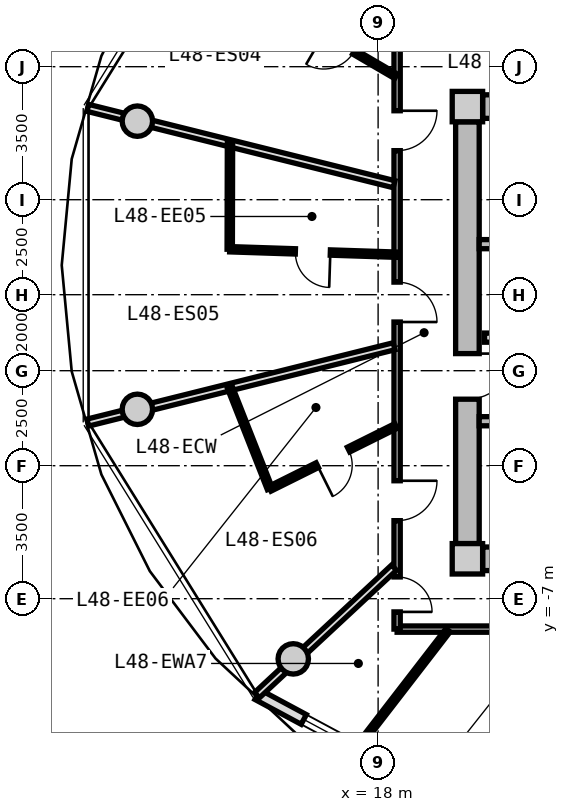
"""IFC4 building model, lengths in metres.
Left out: names, types, materials, properties, quantities, classifications, styles, units other than length and angle.
Written with IfcOpenShell. Run it as: python <this file> out.ifc"""

import sys

from ifc_helpers import new_model, si_unit, direction, frame, frame_2d, origin, origin_2d, place, context, subcontext, project, spatial, rectangle, circle, extrude, source, transform, mapped, element, fill, save


model = new_model("IFC4")
c1 = context("Model", 3, precision=1e-05, world=origin(), true_north=direction((0.0, 1.0)))
c2 = subcontext(c1, "Body", "Model", "MODEL_VIEW")
j1 = project(units=[si_unit("LENGTHUNIT", "METRE"), si_unit("PLANEANGLEUNIT", "RADIAN")], contexts=[c1])
p1 = place(None, origin())
s1 = spatial("IfcSite", under=j1, at=p1, CompositionType="ELEMENT")
p2 = place(p1, origin())
s2 = spatial("IfcBuilding", under=s1, at=p2, CompositionType="ELEMENT")
p3 = place(p2, frame((0.0, 0.0, 155.65)))
s3 = spatial("IfcBuildingStorey", under=s2, at=p3, CompositionType="ELEMENT", Elevation=155.65)
m1 = source(origin(), c2, "Body", "SweptSolid", [
    extrude(rectangle(XDim=0.8, YDim=0.8, at=origin_2d()), origin(), (0.0, 0.0, 1.0), 3.05),
])
for number, where, z_axis, x_axis in (
    (1, (20.35, -5.95, 0.0), (0.0, 0.0, 1.0), (1.0, 0.0, 0.0)),
    (2, (20.35, 5.95, 0.0), (0.0, 0.0, 1.0), (1.0, 0.0, 0.0)),
):
    element("IfcColumn", number, at=place(p3, frame(where, z_axis=z_axis, x_axis=x_axis)), inside=s3, PredefinedType="COLUMN", context=c2, shape_type="MappedRepresentation", body=[
        mapped(m1, transform((0.0, 0.0, 0.0), x_axis=(1.0, 0.0, 0.0), y_axis=(0.0, 1.0, 0.0), z_axis=(0.0, 0.0, 1.0), scale=1.0)),
    ])
m2 = source(origin(), c2, "Body", "SweptSolid", [
    extrude(rectangle(XDim=14.5, YDim=0.62, at=frame_2d((7.25, 0.0))), origin(), (0.0, 0.0, 1.0), 2.81),
])
for number, where, z_axis, x_axis in (
    (3, (20.75, 5.95, 0.0), (0.0, 0.0, 1.0), (1.0, 0.0, 0.0)),
    (4, (35.25, -5.95, 0.0), (0.0, 0.0, 1.0), (-1.0, 0.0, 0.0)),
):
    element("IfcWall", number, at=place(p3, frame(where, z_axis=z_axis, x_axis=x_axis)), inside=s3, PredefinedType="SHEAR", context=c2, shape_type="MappedRepresentation", body=[
        mapped(m2, transform((0.0, 0.0, 0.0), x_axis=(1.0, 0.0, 0.0), y_axis=(0.0, 1.0, 0.0), z_axis=(0.0, 0.0, 1.0), scale=1.0)),
    ])
m3 = source(origin(), c2, "Body", "SweptSolid", [
    extrude(rectangle(XDim=11.1, YDim=0.62, at=frame_2d((5.55, 0.0))), origin(), (0.0, 0.0, 1.0), 2.81),
])
p4 = place(p3, frame((20.35, -5.55, 0.0), z_axis=(0.0, 0.0, 1.0), x_axis=(0.0, 1.0, 0.0)))
e5 = element("IfcWall", 5, at=p4, inside=s3, PredefinedType="SHEAR", context=c2, shape_type="MappedRepresentation", body=[
    mapped(m3, transform((0.0, 0.0, 0.0), x_axis=(1.0, 0.0, 0.0), y_axis=(0.0, 1.0, 0.0), z_axis=(0.0, 0.0, 1.0), scale=1.0)),
])
p5 = place(p4, frame((3.8, 0.0, 0.0)))
e6 = element("IfcOpeningElement", 6, at=p5, cuts=e5, PredefinedType="OPENING", context=c2, shape_type="SweptSolid", body=[
    extrude(rectangle(XDim=1.2, YDim=2.15, at=frame_2d((0.6, 1.075))), frame((0.0, 0.32, 0.0), z_axis=(0.0, -1.0, 0.0), x_axis=(1.0, 0.0, 0.0)), (0.0, 0.0, 1.0), 0.64),
])
m4 = source(origin(), c2, "Body", "SweptSolid", [
    extrude(circle(Radius=0.4, at=origin_2d()), origin(), (0.0, 0.0, 1.0), 3.05),
])
for number, where, z_axis, x_axis in (
    (7, (11.665, 5.567, 0.0), (0.0, 0.0, 1.0), (1.0, 0.0, 0.0)),
    (8, (11.665, -2.016, 0.0), (0.0, 0.0, 1.0), (1.0, 0.0, 0.0)),
    (9, (15.767, -8.584, 0.0), (0.0, 0.0, 1.0), (1.0, 0.0, 0.0)),
):
    element("IfcColumn", number, at=place(p3, frame(where, z_axis=z_axis, x_axis=x_axis)), inside=s3, PredefinedType="COLUMN", context=c2, shape_type="MappedRepresentation", body=[
        mapped(m4, transform((0.0, 0.0, 0.0), x_axis=(1.0, 0.0, 0.0), y_axis=(0.0, 1.0, 0.0), z_axis=(0.0, 0.0, 1.0), scale=1.0)),
    ])
m5 = source(origin(), c2, "Body", "SweptSolid", [
    extrude(rectangle(XDim=8.742, YDim=0.29, at=frame_2d((4.371, 0.0))), origin(), (0.0, 0.0, 1.0), 2.81),
])
p6 = place(p3, frame((22.529, -13.66, 0.0), z_axis=(0.0, 0.0, 1.0), x_axis=(-0.880998740657, 0.473118609823, 0.0)))
e10 = element("IfcWall", 10, at=p6, inside=s3, PredefinedType="SOLIDWALL", context=c2, shape_type="MappedRepresentation", body=[
    mapped(m5, transform((0.0, 0.0, 0.0), x_axis=(1.0, 0.0, 0.0), y_axis=(0.0, 1.0, 0.0), z_axis=(0.0, 0.0, 1.0), scale=1.0)),
])
p7 = place(p6, frame((0.9, 0.0, 0.0)))
e11 = element("IfcOpeningElement", 11, at=p7, cuts=e10, PredefinedType="OPENING", context=c2, shape_type="SweptSolid", body=[
    extrude(rectangle(XDim=1.15, YDim=2.25, at=frame_2d((0.575, 1.125))), frame((0.0, 0.155, 0.0), z_axis=(0.0, -1.0, 0.0), x_axis=(1.0, 0.0, 0.0)), (0.0, 0.0, 1.0), 0.31),
])
p8 = place(p6, frame((6.161, 0.0, 0.85)))
e12 = element("IfcOpeningElement", 12, at=p8, cuts=e10, PredefinedType="OPENING", context=c2, shape_type="SweptSolid", body=[
    extrude(rectangle(XDim=1.2, YDim=1.5, at=frame_2d((0.6, 0.75))), frame((0.0, 0.155, 0.0), z_axis=(0.0, -1.0, 0.0), x_axis=(1.0, 0.0, 0.0)), (0.0, 0.0, 1.0), 0.31),
])
m6 = source(origin(), c2, "Body", "SweptSolid", [
    extrude(rectangle(XDim=7.88, YDim=0.24, at=frame_2d((3.94, 0.0))), origin(), (0.0, 0.0, 1.0), 2.81),
])
p9 = place(p3, frame((20.66, 2.33, 0.0), z_axis=(0.0, 0.0, 1.0), x_axis=(1.0, 0.0, 0.0)))
e13 = element("IfcWall", 13, at=p9, inside=s3, PredefinedType="PARTITIONING", context=c2, shape_type="MappedRepresentation", body=[
    mapped(m6, transform((0.0, 0.0, 0.0), x_axis=(1.0, 0.0, 0.0), y_axis=(0.0, 1.0, 0.0), z_axis=(0.0, 0.0, 1.0), scale=1.0)),
])
p10 = place(p3, frame((20.66, -2.33, 0.0), z_axis=(0.0, 0.0, 1.0), x_axis=(1.0, 0.0, 0.0)))
e14 = element("IfcWall", 14, at=p10, inside=s3, PredefinedType="PARTITIONING", context=c2, shape_type="MappedRepresentation", body=[
    mapped(m6, transform((0.0, 0.0, 0.0), x_axis=(1.0, 0.0, 0.0), y_axis=(0.0, 1.0, 0.0), z_axis=(0.0, 0.0, 1.0), scale=1.0)),
])
p11 = place(p10, frame((1.0, 0.0, 0.0)))
e15 = element("IfcOpeningElement", 15, at=p11, cuts=e14, PredefinedType="OPENING", context=c2, shape_type="SweptSolid", body=[
    extrude(rectangle(XDim=1.1, YDim=2.15, at=frame_2d((0.55, 1.075))), frame((0.0, 0.13, 0.0), z_axis=(0.0, -1.0, 0.0), x_axis=(1.0, 0.0, 0.0)), (0.0, 0.0, 1.0), 0.26),
])
m7 = source(origin(), c2, "Body", "SweptSolid", [
    extrude(rectangle(XDim=7.62, YDim=0.24, at=frame_2d((3.81, 0.0))), origin(), (0.0, 0.0, 1.0), 2.795),
])
p12 = place(p3, frame((20.8, -0.13, 0.0), z_axis=(0.0, 0.0, 1.0), x_axis=(1.0, 0.0, 0.0)))
e16 = element("IfcWall", 16, at=p12, inside=s3, PredefinedType="PARTITIONING", context=c2, shape_type="MappedRepresentation", body=[
    mapped(m7, transform((0.0, 0.0, 0.0), x_axis=(1.0, 0.0, 0.0), y_axis=(0.0, 1.0, 0.0), z_axis=(0.0, 0.0, 1.0), scale=1.0)),
])
p13 = place(p12, frame((6.22, 0.0, 0.0)))
e17 = element("IfcOpeningElement", 17, at=p13, cuts=e16, PredefinedType="OPENING", context=c2, shape_type="SweptSolid", body=[
    extrude(rectangle(XDim=1.0, YDim=2.1, at=frame_2d((0.5, 1.05))), frame((0.0, 0.13, 0.0), z_axis=(0.0, -1.0, 0.0), x_axis=(1.0, 0.0, 0.0)), (0.0, 0.0, 1.0), 0.26),
])
p14 = place(p12, frame((2.4, 0.0, 0.0)))
e18 = element("IfcOpeningElement", 18, at=p14, cuts=e16, PredefinedType="OPENING", context=c2, shape_type="SweptSolid", body=[
    extrude(rectangle(XDim=1.0, YDim=2.1, at=frame_2d((0.5, 1.05))), frame((0.0, 0.13, 0.0), z_axis=(0.0, -1.0, 0.0), x_axis=(1.0, 0.0, 0.0)), (0.0, 0.0, 1.0), 0.26),
])
m8 = source(origin(), c2, "Body", "SweptSolid", [
    extrude(rectangle(XDim=8.6, YDim=0.165, at=frame_2d((4.3, 0.0))), origin(), (0.0, 0.0, 1.0), 2.795),
])
p15 = place(p3, frame((27.1, -7.8, 0.0), z_axis=(0.0, 0.0, 1.0), x_axis=(-1.0, 0.0, 0.0)))
e19 = element("IfcWall", 19, at=p15, inside=s3, PredefinedType="PARTITIONING", context=c2, shape_type="MappedRepresentation", body=[
    mapped(m8, transform((0.0, 0.0, 0.0), x_axis=(1.0, 0.0, 0.0), y_axis=(0.0, 1.0, 0.0), z_axis=(0.0, 0.0, 1.0), scale=1.0)),
])
p16 = place(p15, frame((4.625, 0.0, 0.0)))
e20 = element("IfcOpeningElement", 20, at=p16, cuts=e19, PredefinedType="OPENING", context=c2, shape_type="SweptSolid", body=[
    extrude(rectangle(XDim=0.92, YDim=2.1, at=frame_2d((0.46, 1.05))), frame((0.0, 0.093, 0.0), z_axis=(0.0, -1.0, 0.0), x_axis=(1.0, 0.0, 0.0)), (0.0, 0.0, 1.0), 0.185),
])
m9 = source(origin(), c2, "Body", "SweptSolid", [
    extrude(rectangle(XDim=15.6, YDim=0.165, at=frame_2d((7.8, 0.0))), origin(), (0.0, 0.0, 1.0), 2.795),
])
p17 = place(p3, frame((18.5, -7.8, 0.0), z_axis=(0.0, 0.0, 1.0), x_axis=(0.0, 1.0, 0.0)))
e21 = element("IfcWall", 21, at=p17, inside=s3, PredefinedType="PARTITIONING", context=c2, shape_type="MappedRepresentation", body=[
    mapped(m9, transform((0.0, 0.0, 0.0), x_axis=(1.0, 0.0, 0.0), y_axis=(0.0, 1.0, 0.0), z_axis=(0.0, 0.0, 1.0), scale=1.0)),
])
p18 = place(p17, frame((12.591, 0.0, 0.0)))
e22 = element("IfcOpeningElement", 22, at=p18, cuts=e21, PredefinedType="OPENING", context=c2, shape_type="SweptSolid", body=[
    extrude(rectangle(XDim=1.05, YDim=2.15, at=frame_2d((0.525, 1.075))), frame((0.0, 0.093, 0.0), z_axis=(0.0, -1.0, 0.0), x_axis=(1.0, 0.0, 0.0)), (0.0, 0.0, 1.0), 0.185),
])
p19 = place(p17, frame((8.081, 0.0, 0.0)))
e23 = element("IfcOpeningElement", 23, at=p19, cuts=e21, PredefinedType="OPENING", context=c2, shape_type="SweptSolid", body=[
    extrude(rectangle(XDim=1.05, YDim=2.15, at=frame_2d((0.525, 1.075))), frame((0.0, 0.093, 0.0), z_axis=(0.0, -1.0, 0.0), x_axis=(1.0, 0.0, 0.0)), (0.0, 0.0, 1.0), 0.185),
])
p20 = place(p17, frame((2.854, 0.0, 0.0)))
e24 = element("IfcOpeningElement", 24, at=p20, cuts=e21, PredefinedType="OPENING", context=c2, shape_type="SweptSolid", body=[
    extrude(rectangle(XDim=1.05, YDim=2.15, at=frame_2d((0.525, 1.075))), frame((0.0, 0.093, 0.0), z_axis=(0.0, -1.0, 0.0), x_axis=(1.0, 0.0, 0.0)), (0.0, 0.0, 1.0), 0.185),
])
p21 = place(p17, frame((0.452, 0.0, 0.0)))
e25 = element("IfcOpeningElement", 25, at=p21, cuts=e21, PredefinedType="OPENING", context=c2, shape_type="SweptSolid", body=[
    extrude(rectangle(XDim=0.92, YDim=2.1, at=frame_2d((0.46, 1.05))), frame((0.0, 0.093, 0.0), z_axis=(0.0, -1.0, 0.0), x_axis=(1.0, 0.0, 0.0)), (0.0, 0.0, 1.0), 0.185),
])
m10 = source(origin(), c2, "Body", "SweptSolid", [
    extrude(rectangle(XDim=8.305, YDim=0.19, at=frame_2d((4.153, 0.0))), origin(), (0.0, 0.0, 1.0), 2.345),
])
p22 = place(p3, frame((18.42, 3.908, 0.0), z_axis=(0.0, 0.0, 1.0), x_axis=(-0.970309994378, 0.241864662175, 0.0)))
e26 = element("IfcWall", 26, at=p22, inside=s3, PredefinedType="PARTITIONING", context=c2, shape_type="MappedRepresentation", body=[
    mapped(m10, transform((0.0, 0.0, 0.0), x_axis=(1.0, 0.0, 0.0), y_axis=(0.0, 1.0, 0.0), z_axis=(0.0, 0.0, 1.0), scale=1.0)),
])
m11 = source(origin(), c2, "Body", "SweptSolid", [
    extrude(rectangle(XDim=3.481, YDim=0.14, at=frame_2d((1.74, 0.0))), origin(), (0.0, 0.0, 1.0), 2.795),
])
p23 = place(p3, frame((18.47, 6.748, 0.0), z_axis=(0.0, 0.0, 1.0), x_axis=(-0.863310428788, 0.504673264148, 0.0)))
e27 = element("IfcWall", 27, at=p23, inside=s3, PredefinedType="PARTITIONING", context=c2, shape_type="MappedRepresentation", body=[
    mapped(m11, transform((0.0, 0.0, 0.0), x_axis=(1.0, 0.0, 0.0), y_axis=(0.0, 1.0, 0.0), z_axis=(0.0, 0.0, 1.0), scale=1.0)),
])
p24 = place(p23, frame((1.28, 0.0, 0.0)))
e28 = element("IfcOpeningElement", 28, at=p24, cuts=e27, PredefinedType="OPENING", context=c2, shape_type="SweptSolid", body=[
    extrude(rectangle(XDim=0.92, YDim=2.1, at=frame_2d((0.46, 1.05))), frame((0.0, 0.08, 0.0), z_axis=(0.0, -1.0, 0.0), x_axis=(1.0, 0.0, 0.0)), (0.0, 0.0, 1.0), 0.16),
])
p25 = place(p3, frame((18.42, -0.357, 0.0), z_axis=(0.0, 0.0, 1.0), x_axis=(-0.970309994378, -0.241864662175, 0.0)))
e29 = element("IfcWall", 29, at=p25, inside=s3, PredefinedType="PARTITIONING", context=c2, shape_type="MappedRepresentation", body=[
    mapped(m10, transform((0.0, 0.0, 0.0), x_axis=(1.0, 0.0, 0.0), y_axis=(0.0, 1.0, 0.0), z_axis=(0.0, 0.0, 1.0), scale=1.0)),
])
m12 = source(origin(), c2, "Body", "SweptSolid", [
    extrude(rectangle(XDim=4.377, YDim=0.14, at=frame_2d((2.188, 0.0))), origin(), (0.0, 0.0, 1.0), 2.795),
])
p26 = place(p3, frame((18.47, 2.053, 0.0), z_axis=(0.0, 0.0, 1.0), x_axis=(-0.99946745582, 0.032631346225, 0.0)))
e30 = element("IfcWall", 30, at=p26, inside=s3, PredefinedType="PARTITIONING", context=c2, shape_type="MappedRepresentation", body=[
    mapped(m12, transform((0.0, 0.0, 0.0), x_axis=(1.0, 0.0, 0.0), y_axis=(0.0, 1.0, 0.0), z_axis=(0.0, 0.0, 1.0), scale=1.0)),
])
p27 = place(p26, frame((1.729, 0.0, 0.0)))
e31 = element("IfcOpeningElement", 31, at=p27, cuts=e30, PredefinedType="OPENING", context=c2, shape_type="SweptSolid", body=[
    extrude(rectangle(XDim=0.92, YDim=2.1, at=frame_2d((0.46, 1.05))), frame((0.0, 0.08, 0.0), z_axis=(0.0, -1.0, 0.0), x_axis=(1.0, 0.0, 0.0)), (0.0, 0.0, 1.0), 0.16),
])
m13 = source(origin(), c2, "Body", "SweptSolid", [
    extrude(rectangle(XDim=2.806, YDim=0.14, at=frame_2d((1.403, 0.0))), origin(), (0.0, 0.0, 1.0), 2.795),
])
p28 = place(p3, frame((14.095, 2.196, 0.0), z_axis=(0.0, 0.0, 1.0), x_axis=(0.002435834444, 0.999997033351, 0.0)))
e32 = element("IfcWall", 32, at=p28, inside=s3, PredefinedType="PARTITIONING", context=c2, shape_type="MappedRepresentation", body=[
    mapped(m13, transform((0.0, 0.0, 0.0), x_axis=(1.0, 0.0, 0.0), y_axis=(0.0, 1.0, 0.0), z_axis=(0.0, 0.0, 1.0), scale=1.0)),
])
m14 = source(origin(), c2, "Body", "SweptSolid", [
    extrude(rectangle(XDim=4.927, YDim=0.19, at=frame_2d((2.463, 0.0))), origin(), (0.0, 0.0, 1.0), 2.345),
])
p29 = place(p3, frame((18.42, -6.183, 0.0), z_axis=(0.0, 0.0, 1.0), x_axis=(-0.732191335987, -0.681098999783, 0.0)))
e33 = element("IfcWall", 33, at=p29, inside=s3, PredefinedType="PARTITIONING", context=c2, shape_type="MappedRepresentation", body=[
    mapped(m14, transform((0.0, 0.0, 0.0), x_axis=(1.0, 0.0, 0.0), y_axis=(0.0, 1.0, 0.0), z_axis=(0.0, 0.0, 1.0), scale=1.0)),
])
m15 = source(origin(), c2, "Body", "SweptSolid", [
    extrude(rectangle(XDim=3.707, YDim=0.14, at=frame_2d((1.854, 0.0))), origin(), (0.0, 0.0, 1.0), 2.795),
])
p30 = place(p3, frame((18.47, -2.456, 0.0), z_axis=(0.0, 0.0, 1.0), x_axis=(-0.895347377717, -0.44536846904, 0.0)))
e34 = element("IfcWall", 34, at=p30, inside=s3, PredefinedType="PARTITIONING", context=c2, shape_type="MappedRepresentation", body=[
    mapped(m15, transform((0.0, 0.0, 0.0), x_axis=(1.0, 0.0, 0.0), y_axis=(0.0, 1.0, 0.0), z_axis=(0.0, 0.0, 1.0), scale=1.0)),
])
p31 = place(p30, frame((1.394, 0.0, 0.0)))
e35 = element("IfcOpeningElement", 35, at=p31, cuts=e34, PredefinedType="OPENING", context=c2, shape_type="SweptSolid", body=[
    extrude(rectangle(XDim=0.92, YDim=2.1, at=frame_2d((0.46, 1.05))), frame((0.0, 0.08, 0.0), z_axis=(0.0, -1.0, 0.0), x_axis=(1.0, 0.0, 0.0)), (0.0, 0.0, 1.0), 0.16),
])
m16 = source(origin(), c2, "Body", "SweptSolid", [
    extrude(rectangle(XDim=2.854, YDim=0.14, at=frame_2d((1.427, 0.0))), origin(), (0.0, 0.0, 1.0), 2.795),
])
p32 = place(p3, frame((15.151, -4.107, 0.0), z_axis=(0.0, 0.0, 1.0), x_axis=(-0.366932834407, 0.930247437532, 0.0)))
e36 = element("IfcWall", 36, at=p32, inside=s3, PredefinedType="PARTITIONING", context=c2, shape_type="MappedRepresentation", body=[
    mapped(m16, transform((0.0, 0.0, 0.0), x_axis=(1.0, 0.0, 0.0), y_axis=(0.0, 1.0, 0.0), z_axis=(0.0, 0.0, 1.0), scale=1.0)),
])
m17 = source(origin(), c2, "Body", "SweptSolid", [
    extrude(rectangle(XDim=3.937, YDim=0.14, at=frame_2d((1.968, 0.0))), origin(), (0.0, 0.0, 1.0), 2.795),
])
p33 = place(p3, frame((19.84, -7.83, 0.0), z_axis=(0.0, 0.0, 1.0), x_axis=(-0.611055586441, -0.79158768957, 0.0)))
e37 = element("IfcWall", 37, at=p33, inside=s3, PredefinedType="PARTITIONING", context=c2, shape_type="MappedRepresentation", body=[
    mapped(m17, transform((0.0, 0.0, 0.0), x_axis=(1.0, 0.0, 0.0), y_axis=(0.0, 1.0, 0.0), z_axis=(0.0, 0.0, 1.0), scale=1.0)),
])
m18 = source(origin(), c2, "Body", "SweptSolid", [
    extrude(rectangle(XDim=1.2, YDim=1.5, at=frame_2d((0.6, 0.75))), frame((0.0, 0.03, 0.0), z_axis=(0.0, -1.0, 0.0), x_axis=(1.0, 0.0, 0.0)), (0.0, 0.0, 1.0), 0.06),
])
p34 = place(p8, origin())
e38 = element("IfcWindow", 38, at=p34, inside=s3, PartitioningType="SINGLE_PANEL", PredefinedType="WINDOW", context=c2, shape_type="MappedRepresentation", body=[
    mapped(m18, transform((0.0, 0.0, 0.0), x_axis=(1.0, 0.0, 0.0), y_axis=(0.0, 1.0, 0.0), z_axis=(0.0, 0.0, 1.0), scale=1.0)),
])
fill(e12, e38)
m19 = source(origin(), c2, "Body", "SweptSolid", [
    extrude(rectangle(XDim=1.2, YDim=2.15, at=frame_2d((0.6, 1.075))), frame((0.0, 0.025, 0.0), z_axis=(0.0, -1.0, 0.0), x_axis=(1.0, 0.0, 0.0)), (0.0, 0.0, 1.0), 0.05),
])
p35 = place(p5, frame((1.2, 0.0, 0.0), z_axis=(0.0, 0.0, 1.0), x_axis=(-1.0, 0.0, 0.0)))
e39 = element("IfcDoor", 39, at=p35, inside=s3, OperationType="SINGLE_SWING_LEFT", PredefinedType="DOOR", context=c2, shape_type="MappedRepresentation", body=[
    mapped(m19, transform((0.0, 0.0, 0.0), x_axis=(1.0, 0.0, 0.0), y_axis=(0.0, 1.0, 0.0), z_axis=(0.0, 0.0, 1.0), scale=1.0)),
])
fill(e6, e39)
m20 = source(origin(), c2, "Body", "SweptSolid", [
    extrude(rectangle(XDim=1.05, YDim=2.15, at=frame_2d((0.525, 1.075))), frame((0.0, 0.025, 0.0), z_axis=(0.0, -1.0, 0.0), x_axis=(1.0, 0.0, 0.0)), (0.0, 0.0, 1.0), 0.05),
])
p36 = place(p18, frame((1.05, 0.0, 0.0), z_axis=(0.0, 0.0, 1.0), x_axis=(-1.0, 0.0, 0.0)))
e40 = element("IfcDoor", 40, at=p36, inside=s3, OperationType="SINGLE_SWING_LEFT", PredefinedType="DOOR", context=c2, shape_type="MappedRepresentation", body=[
    mapped(m20, transform((0.0, 0.0, 0.0), x_axis=(1.0, 0.0, 0.0), y_axis=(0.0, 1.0, 0.0), z_axis=(0.0, 0.0, 1.0), scale=1.0)),
])
fill(e22, e40)
m21 = source(origin(), c2, "Body", "SweptSolid", [
    extrude(rectangle(XDim=0.92, YDim=2.1, at=frame_2d((0.46, 1.05))), frame((0.0, 0.025, 0.0), z_axis=(0.0, -1.0, 0.0), x_axis=(1.0, 0.0, 0.0)), (0.0, 0.0, 1.0), 0.05),
])
p37 = place(p24, origin())
e41 = element("IfcDoor", 41, at=p37, inside=s3, OperationType="SINGLE_SWING_RIGHT", PredefinedType="DOOR", context=c2, shape_type="MappedRepresentation", body=[
    mapped(m21, transform((0.0, 0.0, 0.0), x_axis=(1.0, 0.0, 0.0), y_axis=(0.0, 1.0, 0.0), z_axis=(0.0, 0.0, 1.0), scale=1.0)),
])
fill(e28, e41)
p38 = place(p19, frame((1.05, 0.0, 0.0), z_axis=(0.0, 0.0, 1.0), x_axis=(-1.0, 0.0, 0.0)))
e42 = element("IfcDoor", 42, at=p38, inside=s3, OperationType="SINGLE_SWING_RIGHT", PredefinedType="DOOR", context=c2, shape_type="MappedRepresentation", body=[
    mapped(m20, transform((0.0, 0.0, 0.0), x_axis=(1.0, 0.0, 0.0), y_axis=(0.0, 1.0, 0.0), z_axis=(0.0, 0.0, 1.0), scale=1.0)),
])
fill(e23, e42)
p39 = place(p27, origin())
e43 = element("IfcDoor", 43, at=p39, inside=s3, OperationType="SINGLE_SWING_LEFT", PredefinedType="DOOR", context=c2, shape_type="MappedRepresentation", body=[
    mapped(m21, transform((0.0, 0.0, 0.0), x_axis=(1.0, 0.0, 0.0), y_axis=(0.0, 1.0, 0.0), z_axis=(0.0, 0.0, 1.0), scale=1.0)),
])
fill(e31, e43)
p40 = place(p20, frame((1.05, 0.0, 0.0), z_axis=(0.0, 0.0, 1.0), x_axis=(-1.0, 0.0, 0.0)))
e44 = element("IfcDoor", 44, at=p40, inside=s3, OperationType="SINGLE_SWING_LEFT", PredefinedType="DOOR", context=c2, shape_type="MappedRepresentation", body=[
    mapped(m20, transform((0.0, 0.0, 0.0), x_axis=(1.0, 0.0, 0.0), y_axis=(0.0, 1.0, 0.0), z_axis=(0.0, 0.0, 1.0), scale=1.0)),
])
fill(e24, e44)
p41 = place(p31, origin())
e45 = element("IfcDoor", 45, at=p41, inside=s3, OperationType="SINGLE_SWING_RIGHT", PredefinedType="DOOR", context=c2, shape_type="MappedRepresentation", body=[
    mapped(m21, transform((0.0, 0.0, 0.0), x_axis=(1.0, 0.0, 0.0), y_axis=(0.0, 1.0, 0.0), z_axis=(0.0, 0.0, 1.0), scale=1.0)),
])
fill(e35, e45)
p42 = place(p21, frame((0.92, 0.0, 0.0), z_axis=(0.0, 0.0, 1.0), x_axis=(-1.0, 0.0, 0.0)))
e46 = element("IfcDoor", 46, at=p42, inside=s3, OperationType="SINGLE_SWING_RIGHT", PredefinedType="DOOR", context=c2, shape_type="MappedRepresentation", body=[
    mapped(m21, transform((0.0, 0.0, 0.0), x_axis=(1.0, 0.0, 0.0), y_axis=(0.0, 1.0, 0.0), z_axis=(0.0, 0.0, 1.0), scale=1.0)),
])
fill(e25, e46)
save(model, sys.argv[1])
